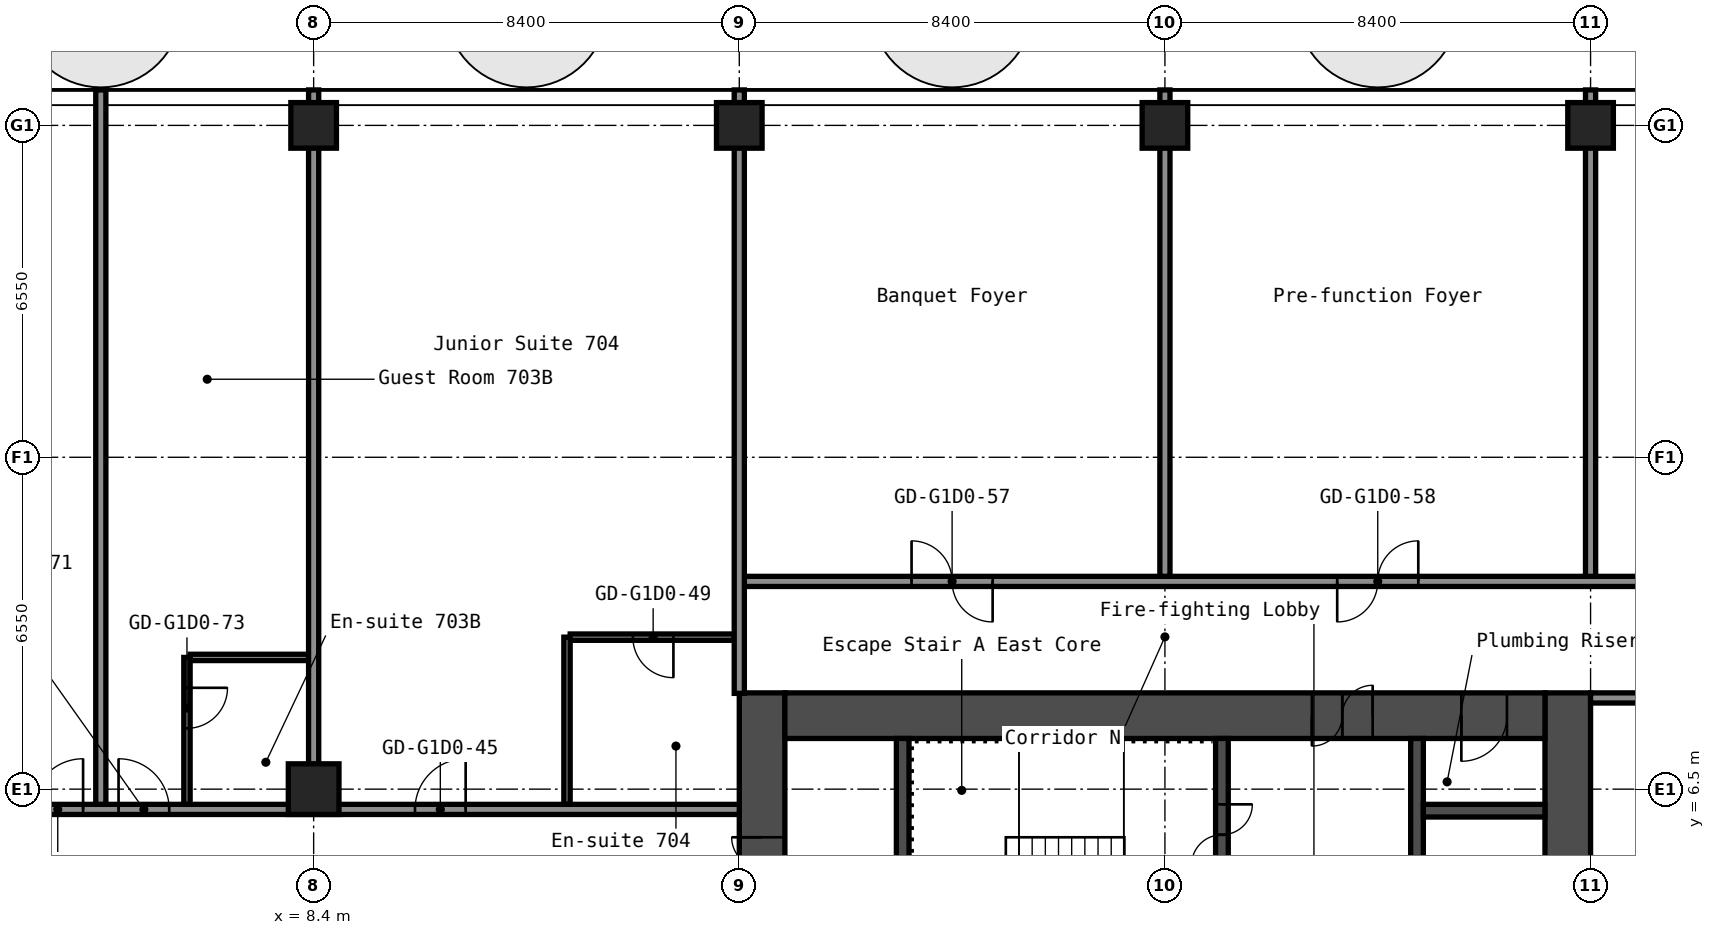
"""IFC4 building model, lengths in metres.
Left out: names, types, materials, properties, quantities, classifications, styles, units other than length and angle.
Written with IfcOpenShell. Run it as: python <this file> out.ifc"""

import sys

from ifc_helpers import new_model, si_unit, direction, frame, frame_2d, origin, origin_2d, place, context, subcontext, project, spatial, rectangle, hollow_rectangle, extrude, element, fill, save


model = new_model("IFC4")
c1 = context("Model", 3, precision=1e-05, world=origin(), true_north=direction((0.0, 1.0)))
c2 = subcontext(c1, "Body", "Model", "MODEL_VIEW")
j1 = project(units=[si_unit("LENGTHUNIT", "METRE"), si_unit("PLANEANGLEUNIT", "RADIAN")], contexts=[c1])
p1 = place(None, origin())
s1 = spatial("IfcSite", under=j1, at=p1, CompositionType="ELEMENT")
p2 = place(p1, origin())
s2 = spatial("IfcBuilding", under=s1, at=p2, CompositionType="ELEMENT")
p3 = place(p2, frame((0.0, 0.0, 29.4)))
s3 = spatial("IfcBuildingStorey", under=s2, at=p3, CompositionType="ELEMENT", Elevation=29.4)
p4 = place(p3, frame((8.4, 6.5, 0.0), z_axis=(0.0, 0.0, 1.0), x_axis=(1.0, 0.0, 0.0)))
e1 = element("IfcColumn", 1, at=p4, inside=s3, PredefinedType="COLUMN", context=c2, shape_type="SweptSolid", body=[
    extrude(hollow_rectangle(XDim=1.0, YDim=1.0, WallThickness=0.04, at=origin_2d()), origin(), (0.0, 0.0, 1.0), 2.8),
])
for number, where, z_axis, x_axis in (
    (2, (8.4, 19.6, 0.0), (0.0, 0.0, 1.0), (1.0, 0.0, 0.0)),
    (3, (16.8, 19.6, 0.0), (0.0, 0.0, 1.0), (1.0, 0.0, 0.0)),
    (4, (25.2, 19.6, 0.0), (0.0, 0.0, 1.0), (1.0, 0.0, 0.0)),
    (5, (33.6, 19.6, 0.0), (0.0, 0.0, 1.0), (1.0, 0.0, 0.0)),
):
    element("IfcColumn", number, at=place(p3, frame(where, z_axis=z_axis, x_axis=x_axis)), inside=s3, PredefinedType="COLUMN", context=c2, shape_type="SweptSolid", body=[
        extrude(hollow_rectangle(XDim=0.9, YDim=0.9, WallThickness=0.036, at=origin_2d()), origin(), (0.0, 0.0, 1.0), 2.8),
    ])
p5 = place(p3, frame((17.25, -8.4, 0.0), z_axis=(0.0, 0.0, 1.0), x_axis=(0.0, 1.0, 0.0)))
e6 = element("IfcWall", 6, at=p5, inside=s3, PredefinedType="SHEAR", context=c2, shape_type="SweptSolid", body=[
    extrude(rectangle(XDim=16.8, YDim=0.9, at=frame_2d((8.4, 0.0))), origin(), (0.0, 0.0, 1.0), 2.8),
])
p6 = place(p5, frame((12.75, 0.0, 0.0)))
e7 = element("IfcOpeningElement", 7, at=p6, cuts=e6, PredefinedType="OPENING", context=c2, shape_type="SweptSolid", body=[
    extrude(rectangle(XDim=1.2, YDim=2.1, at=frame_2d((0.6, 1.05))), frame((0.0, 0.46, 0.0), z_axis=(0.0, -1.0, 0.0), x_axis=(1.0, 0.0, 0.0)), (0.0, 0.0, 1.0), 0.92),
])
p7 = place(p5, frame((2.85, 0.0, 0.0)))
e8 = element("IfcOpeningElement", 8, at=p7, cuts=e6, PredefinedType="OPENING", context=c2, shape_type="SweptSolid", body=[
    extrude(rectangle(XDim=1.2, YDim=2.1, at=frame_2d((0.6, 1.05))), frame((0.0, 0.46, 0.0), z_axis=(0.0, -1.0, 0.0), x_axis=(1.0, 0.0, 0.0)), (0.0, 0.0, 1.0), 0.92),
])
p8 = place(p3, frame((33.15, -8.4, 0.0), z_axis=(0.0, 0.0, 1.0), x_axis=(0.0, 1.0, 0.0)))
e9 = element("IfcWall", 9, at=p8, inside=s3, PredefinedType="SHEAR", context=c2, shape_type="SweptSolid", body=[
    extrude(rectangle(XDim=16.8, YDim=0.9, at=frame_2d((8.4, 0.0))), origin(), (0.0, 0.0, 1.0), 2.8),
])
p9 = place(p3, frame((17.7, 7.95, 0.0), z_axis=(0.0, 0.0, 1.0), x_axis=(1.0, 0.0, 0.0)))
e10 = element("IfcWall", 10, at=p9, inside=s3, PredefinedType="SHEAR", context=c2, shape_type="SweptSolid", body=[
    extrude(rectangle(XDim=15.0, YDim=0.9, at=frame_2d((7.5, 0.0))), origin(), (0.0, 0.0, 1.0), 2.8),
])
p10 = place(p9, frame((10.4, 0.0, 0.0)))
e11 = element("IfcOpeningElement", 11, at=p10, cuts=e10, PredefinedType="OPENING", context=c2, shape_type="SweptSolid", body=[
    extrude(rectangle(XDim=1.2, YDim=2.1, at=frame_2d((0.6, 1.05))), frame((0.0, 0.46, 0.0), z_axis=(0.0, -1.0, 0.0), x_axis=(1.0, 0.0, 0.0)), (0.0, 0.0, 1.0), 0.92),
])
p11 = place(p9, frame((13.35, 0.0, 0.0)))
e12 = element("IfcOpeningElement", 12, at=p11, cuts=e10, PredefinedType="OPENING", context=c2, shape_type="SweptSolid", body=[
    extrude(rectangle(XDim=0.9, YDim=2.1, at=frame_2d((0.45, 1.05))), frame((0.0, 0.46, 0.0), z_axis=(0.0, -1.0, 0.0), x_axis=(1.0, 0.0, 0.0)), (0.0, 0.0, 1.0), 0.92),
])
p12 = place(p3, frame((20.025, 1.2, 0.0), z_axis=(0.0, 0.0, 1.0), x_axis=(0.0, 1.0, 0.0)))
e13 = element("IfcWall", 13, at=p12, inside=s3, PredefinedType="SHEAR", context=c2, shape_type="SweptSolid", body=[
    extrude(rectangle(XDim=6.3, YDim=0.25, at=frame_2d((3.15, 0.0))), origin(), (0.0, 0.0, 1.0), 2.8),
])
p13 = place(p3, frame((26.325, 3.75, 0.0), z_axis=(0.0, 0.0, 1.0), x_axis=(0.0, 1.0, 0.0)))
e14 = element("IfcWall", 14, at=p13, inside=s3, PredefinedType="SHEAR", context=c2, shape_type="SweptSolid", body=[
    extrude(rectangle(XDim=3.75, YDim=0.25, at=frame_2d((1.875, 0.0))), origin(), (0.0, 0.0, 1.0), 2.8),
])
p14 = place(p13, frame((1.25, 0.0, 0.0)))
e15 = element("IfcOpeningElement", 15, at=p14, cuts=e14, PredefinedType="OPENING", context=c2, shape_type="SweptSolid", body=[
    extrude(rectangle(XDim=1.2, YDim=2.1, at=frame_2d((0.6, 1.05))), frame((0.0, 0.135, 0.0), z_axis=(0.0, -1.0, 0.0), x_axis=(1.0, 0.0, 0.0)), (0.0, 0.0, 1.0), 0.27),
])
p15 = place(p3, frame((30.175, 1.45, 0.0), z_axis=(0.0, 0.0, 1.0), x_axis=(0.0, 1.0, 0.0)))
e16 = element("IfcWall", 16, at=p15, inside=s3, PredefinedType="SHEAR", context=c2, shape_type="SweptSolid", body=[
    extrude(rectangle(XDim=6.05, YDim=0.25, at=frame_2d((3.025, 0.0))), origin(), (0.0, 0.0, 1.0), 2.8),
])
p16 = place(p15, frame((2.625, 0.0, 0.0)))
e17 = element("IfcOpeningElement", 17, at=p16, cuts=e16, PredefinedType="OPENING", context=c2, shape_type="SweptSolid", body=[
    extrude(rectangle(XDim=1.1, YDim=2.1, at=frame_2d((0.55, 1.05))), frame((0.0, 0.135, 0.0), z_axis=(0.0, -1.0, 0.0), x_axis=(1.0, 0.0, 0.0)), (0.0, 0.0, 1.0), 0.27),
])
p17 = place(p3, frame((30.3, 6.075, 0.0), z_axis=(0.0, 0.0, 1.0), x_axis=(1.0, 0.0, 0.0)))
e18 = element("IfcWall", 18, at=p17, inside=s3, PredefinedType="SHEAR", context=c2, shape_type="SweptSolid", body=[
    extrude(rectangle(XDim=2.4, YDim=0.25, at=frame_2d((1.2, 0.0))), origin(), (0.0, 0.0, 1.0), 2.8),
])
p18 = place(p3, frame((-16.8, 6.1, 0.0), z_axis=(0.0, 0.0, 1.0), x_axis=(1.0, 0.0, 0.0)))
e19 = element("IfcWall", 19, at=p18, inside=s3, PredefinedType="PARTITIONING", context=c2, shape_type="SweptSolid", body=[
    extrude(rectangle(XDim=33.6, YDim=0.2, at=frame_2d((16.8, 0.0))), origin(), (0.0, 0.0, 1.0), 2.8),
])
p19 = place(p18, frame((2.85, 0.0, 0.0)))
e20 = element("IfcOpeningElement", 20, at=p19, cuts=e19, PredefinedType="OPENING", context=c2, shape_type="SweptSolid", body=[
    extrude(rectangle(XDim=1.0, YDim=2.1, at=frame_2d((0.5, 1.05))), frame((0.0, 0.11, 0.0), z_axis=(0.0, -1.0, 0.0), x_axis=(1.0, 0.0, 0.0)), (0.0, 0.0, 1.0), 0.22),
])
p20 = place(p18, frame((4.55, 0.0, 0.0)))
e21 = element("IfcOpeningElement", 21, at=p20, cuts=e19, PredefinedType="OPENING", context=c2, shape_type="SweptSolid", body=[
    extrude(rectangle(XDim=1.0, YDim=2.1, at=frame_2d((0.5, 1.05))), frame((0.0, 0.11, 0.0), z_axis=(0.0, -1.0, 0.0), x_axis=(1.0, 0.0, 0.0)), (0.0, 0.0, 1.0), 0.22),
])
p21 = place(p18, frame((13.8, 0.0, 0.0)))
e22 = element("IfcOpeningElement", 22, at=p21, cuts=e19, PredefinedType="OPENING", context=c2, shape_type="SweptSolid", body=[
    extrude(rectangle(XDim=1.0, YDim=2.1, at=frame_2d((0.5, 1.05))), frame((0.0, 0.11, 0.0), z_axis=(0.0, -1.0, 0.0), x_axis=(1.0, 0.0, 0.0)), (0.0, 0.0, 1.0), 0.22),
])
p22 = place(p18, frame((19.65, 0.0, 0.0)))
e23 = element("IfcOpeningElement", 23, at=p22, cuts=e19, PredefinedType="OPENING", context=c2, shape_type="SweptSolid", body=[
    extrude(rectangle(XDim=1.0, YDim=2.1, at=frame_2d((0.5, 1.05))), frame((0.0, 0.11, 0.0), z_axis=(0.0, -1.0, 0.0), x_axis=(1.0, 0.0, 0.0)), (0.0, 0.0, 1.0), 0.22),
])
p23 = place(p18, frame((21.35, 0.0, 0.0)))
e24 = element("IfcOpeningElement", 24, at=p23, cuts=e19, PredefinedType="OPENING", context=c2, shape_type="SweptSolid", body=[
    extrude(rectangle(XDim=1.0, YDim=2.1, at=frame_2d((0.5, 1.05))), frame((0.0, 0.11, 0.0), z_axis=(0.0, -1.0, 0.0), x_axis=(1.0, 0.0, 0.0)), (0.0, 0.0, 1.0), 0.22),
])
p24 = place(p18, frame((27.2, 0.0, 0.0)))
e25 = element("IfcOpeningElement", 25, at=p24, cuts=e19, PredefinedType="OPENING", context=c2, shape_type="SweptSolid", body=[
    extrude(rectangle(XDim=1.0, YDim=2.1, at=frame_2d((0.5, 1.05))), frame((0.0, 0.11, 0.0), z_axis=(0.0, -1.0, 0.0), x_axis=(1.0, 0.0, 0.0)), (0.0, 0.0, 1.0), 0.22),
])
p25 = place(p3, frame((33.6, 8.3, 0.0), z_axis=(0.0, 0.0, 1.0), x_axis=(1.0, 0.0, 0.0)))
e26 = element("IfcWall", 26, at=p25, inside=s3, PredefinedType="PARTITIONING", context=c2, shape_type="SweptSolid", body=[
    extrude(rectangle(XDim=15.0, YDim=0.2, at=frame_2d((7.5, 0.0))), origin(), (0.0, 0.0, 1.0), 2.8),
])
p26 = place(p25, frame((4.8, 0.0, 0.0)))
e27 = element("IfcOpeningElement", 27, at=p26, cuts=e26, PredefinedType="OPENING", context=c2, shape_type="SweptSolid", body=[
    extrude(rectangle(XDim=1.6, YDim=2.1, at=frame_2d((0.8, 1.05))), frame((0.0, 0.11, 0.0), z_axis=(0.0, -1.0, 0.0), x_axis=(1.0, 0.0, 0.0)), (0.0, 0.0, 1.0), 0.22),
])
p27 = place(p3, frame((5.962, 9.1, 0.0), z_axis=(0.0, 0.0, 1.0), x_axis=(1.0, 0.0, 0.0)))
e28 = element("IfcWall", 28, at=p27, inside=s3, PredefinedType="PARTITIONING", context=c2, shape_type="SweptSolid", body=[
    extrude(rectangle(XDim=2.338, YDim=0.125, at=frame_2d((1.169, 0.0))), origin(), (0.0, 0.0, 1.0), 2.8),
])
p28 = place(p3, frame((13.462, 9.5, 0.0), z_axis=(0.0, 0.0, 1.0), x_axis=(1.0, 0.0, 0.0)))
e29 = element("IfcWall", 29, at=p28, inside=s3, PredefinedType="PARTITIONING", context=c2, shape_type="SweptSolid", body=[
    extrude(rectangle(XDim=3.238, YDim=0.125, at=frame_2d((1.619, 0.0))), origin(), (0.0, 0.0, 1.0), 2.8),
])
p29 = place(p28, frame((1.238, 0.0, 0.0)))
e30 = element("IfcOpeningElement", 30, at=p29, cuts=e29, PredefinedType="OPENING", context=c2, shape_type="SweptSolid", body=[
    extrude(rectangle(XDim=0.8, YDim=2.1, at=frame_2d((0.4, 1.05))), frame((0.0, 0.073, 0.0), z_axis=(0.0, -1.0, 0.0), x_axis=(1.0, 0.0, 0.0)), (0.0, 0.0, 1.0), 0.145),
])
p30 = place(p3, frame((16.8, 10.6, 0.0), z_axis=(0.0, 0.0, 1.0), x_axis=(1.0, 0.0, 0.0)))
e31 = element("IfcWall", 31, at=p30, inside=s3, PredefinedType="PARTITIONING", context=c2, shape_type="SweptSolid", body=[
    extrude(rectangle(XDim=34.3, YDim=0.2, at=frame_2d((17.15, 0.0))), origin(), (0.0, 0.0, 1.0), 2.8),
])
p31 = place(p30, frame((3.4, 0.0, 0.0)))
e32 = element("IfcOpeningElement", 32, at=p31, cuts=e31, PredefinedType="OPENING", context=c2, shape_type="SweptSolid", body=[
    extrude(rectangle(XDim=1.6, YDim=2.1, at=frame_2d((0.8, 1.05))), frame((0.0, 0.11, 0.0), z_axis=(0.0, -1.0, 0.0), x_axis=(1.0, 0.0, 0.0)), (0.0, 0.0, 1.0), 0.22),
])
p32 = place(p30, frame((11.8, 0.0, 0.0)))
e33 = element("IfcOpeningElement", 33, at=p32, cuts=e31, PredefinedType="OPENING", context=c2, shape_type="SweptSolid", body=[
    extrude(rectangle(XDim=1.6, YDim=2.1, at=frame_2d((0.8, 1.05))), frame((0.0, 0.11, 0.0), z_axis=(0.0, -1.0, 0.0), x_axis=(1.0, 0.0, 0.0)), (0.0, 0.0, 1.0), 0.22),
])
p33 = place(p30, frame((20.2, 0.0, 0.0)))
e34 = element("IfcOpeningElement", 34, at=p33, cuts=e31, PredefinedType="OPENING", context=c2, shape_type="SweptSolid", body=[
    extrude(rectangle(XDim=1.6, YDim=2.1, at=frame_2d((0.8, 1.05))), frame((0.0, 0.11, 0.0), z_axis=(0.0, -1.0, 0.0), x_axis=(1.0, 0.0, 0.0)), (0.0, 0.0, 1.0), 0.22),
])
p34 = place(p30, frame((28.8, 0.0, 0.0)))
e35 = element("IfcOpeningElement", 35, at=p34, cuts=e31, PredefinedType="OPENING", context=c2, shape_type="SweptSolid", body=[
    extrude(rectangle(XDim=1.6, YDim=2.1, at=frame_2d((0.8, 1.05))), frame((0.0, 0.11, 0.0), z_axis=(0.0, -1.0, 0.0), x_axis=(1.0, 0.0, 0.0)), (0.0, 0.0, 1.0), 0.22),
])
p35 = place(p3, frame((4.2, 6.2, 0.0), z_axis=(0.0, 0.0, 1.0), x_axis=(0.0, 1.0, 0.0)))
e36 = element("IfcWall", 36, at=p35, inside=s3, PredefinedType="PARTITIONING", context=c2, shape_type="SweptSolid", body=[
    extrude(rectangle(XDim=14.1, YDim=0.2, at=frame_2d((7.05, 0.0))), origin(), (0.0, 0.0, 1.0), 2.8),
])
p36 = place(p3, frame((5.9, 6.2, 0.0), z_axis=(0.0, 0.0, 1.0), x_axis=(0.0, 1.0, 0.0)))
e37 = element("IfcWall", 37, at=p36, inside=s3, PredefinedType="PARTITIONING", context=c2, shape_type="SweptSolid", body=[
    extrude(rectangle(XDim=2.9, YDim=0.125, at=frame_2d((1.45, 0.0))), origin(), (0.0, 0.0, 1.0), 2.8),
])
p37 = place(p36, frame((1.5, 0.0, 0.0)))
e38 = element("IfcOpeningElement", 38, at=p37, cuts=e37, PredefinedType="OPENING", context=c2, shape_type="SweptSolid", body=[
    extrude(rectangle(XDim=0.8, YDim=2.1, at=frame_2d((0.4, 1.05))), frame((0.0, 0.073, 0.0), z_axis=(0.0, -1.0, 0.0), x_axis=(1.0, 0.0, 0.0)), (0.0, 0.0, 1.0), 0.145),
])
p38 = place(p3, frame((8.4, 6.99, 0.0), z_axis=(0.0, 0.0, 1.0), x_axis=(0.0, 1.0, 0.0)))
e39 = element("IfcWall", 39, at=p38, inside=s3, PredefinedType="PARTITIONING", context=c2, shape_type="SweptSolid", body=[
    extrude(rectangle(XDim=13.31, YDim=0.2, at=frame_2d((6.655, 0.0))), origin(), (0.0, 0.0, 1.0), 2.8),
])
p39 = place(p3, frame((13.4, 6.2, 0.0), z_axis=(0.0, 0.0, 1.0), x_axis=(0.0, 1.0, 0.0)))
e40 = element("IfcWall", 40, at=p39, inside=s3, PredefinedType="PARTITIONING", context=c2, shape_type="SweptSolid", body=[
    extrude(rectangle(XDim=3.3, YDim=0.125, at=frame_2d((1.65, 0.0))), origin(), (0.0, 0.0, 1.0), 2.8),
])
p40 = place(p3, frame((16.8, 8.39, 0.0), z_axis=(0.0, 0.0, 1.0), x_axis=(0.0, 1.0, 0.0)))
e41 = element("IfcWall", 41, at=p40, inside=s3, PredefinedType="PARTITIONING", context=c2, shape_type="SweptSolid", body=[
    extrude(rectangle(XDim=11.91, YDim=0.2, at=frame_2d((5.955, 0.0))), origin(), (0.0, 0.0, 1.0), 2.8),
])
for number, where, z_axis, x_axis in (
    (42, (25.2, 10.7, 0.0), (0.0, 0.0, 1.0), (0.0, 1.0, 0.0)),
    (43, (33.6, 10.7, 0.0), (0.0, 0.0, 1.0), (0.0, 1.0, 0.0)),
):
    element("IfcWall", number, at=place(p3, frame(where, z_axis=z_axis, x_axis=x_axis)), inside=s3, PredefinedType="PARTITIONING", context=c2, shape_type="SweptSolid", body=[
        extrude(rectangle(XDim=9.6, YDim=0.2, at=frame_2d((4.8, 0.0))), origin(), (0.0, 0.0, 1.0), 2.8),
    ])
p41 = place(p6, origin())
e44 = element("IfcDoor", 44, at=p41, inside=s3, OperationType="DOUBLE_DOOR_SINGLE_SWING", PredefinedType="DOOR", context=c2, shape_type="SweptSolid", body=[
    extrude(rectangle(XDim=1.2, YDim=2.1, at=frame_2d((0.6, 1.05))), frame((0.0, 0.025, 0.0), z_axis=(0.0, -1.0, 0.0), x_axis=(1.0, 0.0, 0.0)), (0.0, 0.0, 1.0), 0.05),
])
fill(e7, e44)
p42 = place(p10, origin())
e45 = element("IfcDoor", 45, at=p42, inside=s3, OperationType="DOUBLE_DOOR_SINGLE_SWING", PredefinedType="DOOR", context=c2, shape_type="SweptSolid", body=[
    extrude(rectangle(XDim=1.2, YDim=2.1, at=frame_2d((0.6, 1.05))), frame((0.0, 0.025, 0.0), z_axis=(0.0, -1.0, 0.0), x_axis=(1.0, 0.0, 0.0)), (0.0, 0.0, 1.0), 0.05),
])
fill(e11, e45)
p43 = place(p11, origin())
e46 = element("IfcDoor", 46, at=p43, inside=s3, OperationType="SINGLE_SWING_LEFT", PredefinedType="DOOR", context=c2, shape_type="SweptSolid", body=[
    extrude(rectangle(XDim=0.9, YDim=2.1, at=frame_2d((0.45, 1.05))), frame((0.0, 0.025, 0.0), z_axis=(0.0, -1.0, 0.0), x_axis=(1.0, 0.0, 0.0)), (0.0, 0.0, 1.0), 0.05),
])
fill(e12, e46)
p44 = place(p14, origin())
e47 = element("IfcDoor", 47, at=p44, inside=s3, OperationType="DOUBLE_DOOR_SINGLE_SWING", PredefinedType="DOOR", context=c2, shape_type="SweptSolid", body=[
    extrude(rectangle(XDim=1.2, YDim=2.1, at=frame_2d((0.6, 1.05))), frame((0.0, 0.025, 0.0), z_axis=(0.0, -1.0, 0.0), x_axis=(1.0, 0.0, 0.0)), (0.0, 0.0, 1.0), 0.05),
])
fill(e15, e47)
p45 = place(p22, origin())
e48 = element("IfcDoor", 48, at=p45, inside=s3, OperationType="SINGLE_SWING_LEFT", PredefinedType="DOOR", context=c2, shape_type="SweptSolid", body=[
    extrude(rectangle(XDim=1.0, YDim=2.1, at=frame_2d((0.5, 1.05))), frame((0.0, 0.025, 0.0), z_axis=(0.0, -1.0, 0.0), x_axis=(1.0, 0.0, 0.0)), (0.0, 0.0, 1.0), 0.05),
])
fill(e23, e48)
p46 = place(p23, origin())
e49 = element("IfcDoor", 49, at=p46, inside=s3, OperationType="SINGLE_SWING_RIGHT", PredefinedType="DOOR", context=c2, shape_type="SweptSolid", body=[
    extrude(rectangle(XDim=1.0, YDim=2.1, at=frame_2d((0.5, 1.05))), frame((0.0, 0.025, 0.0), z_axis=(0.0, -1.0, 0.0), x_axis=(1.0, 0.0, 0.0)), (0.0, 0.0, 1.0), 0.05),
])
fill(e24, e49)
p47 = place(p24, origin())
e50 = element("IfcDoor", 50, at=p47, inside=s3, OperationType="SINGLE_SWING_LEFT", PredefinedType="DOOR", context=c2, shape_type="SweptSolid", body=[
    extrude(rectangle(XDim=1.0, YDim=2.1, at=frame_2d((0.5, 1.05))), frame((0.0, 0.025, 0.0), z_axis=(0.0, -1.0, 0.0), x_axis=(1.0, 0.0, 0.0)), (0.0, 0.0, 1.0), 0.05),
])
fill(e25, e50)
p48 = place(p29, origin())
e51 = element("IfcDoor", 51, at=p48, inside=s3, OperationType="SINGLE_SWING_RIGHT", PredefinedType="DOOR", context=c2, shape_type="SweptSolid", body=[
    extrude(rectangle(XDim=0.8, YDim=2.1, at=frame_2d((0.4, 1.05))), frame((0.0, 0.025, 0.0), z_axis=(0.0, -1.0, 0.0), x_axis=(1.0, 0.0, 0.0)), (0.0, 0.0, 1.0), 0.05),
])
fill(e30, e51)
p49 = place(p31, origin())
e52 = element("IfcDoor", 52, at=p49, inside=s3, OperationType="DOUBLE_DOOR_SINGLE_SWING", PredefinedType="DOOR", context=c2, shape_type="SweptSolid", body=[
    extrude(rectangle(XDim=1.6, YDim=2.1, at=frame_2d((0.8, 1.05))), frame((0.0, 0.025, 0.0), z_axis=(0.0, -1.0, 0.0), x_axis=(1.0, 0.0, 0.0)), (0.0, 0.0, 1.0), 0.05),
])
fill(e32, e52)
p50 = place(p32, origin())
e53 = element("IfcDoor", 53, at=p50, inside=s3, OperationType="DOUBLE_DOOR_SINGLE_SWING", PredefinedType="DOOR", context=c2, shape_type="SweptSolid", body=[
    extrude(rectangle(XDim=1.6, YDim=2.1, at=frame_2d((0.8, 1.05))), frame((0.0, 0.025, 0.0), z_axis=(0.0, -1.0, 0.0), x_axis=(1.0, 0.0, 0.0)), (0.0, 0.0, 1.0), 0.05),
])
fill(e33, e53)
p51 = place(p37, origin())
e54 = element("IfcDoor", 54, at=p51, inside=s3, OperationType="SINGLE_SWING_RIGHT", PredefinedType="DOOR", context=c2, shape_type="SweptSolid", body=[
    extrude(rectangle(XDim=0.8, YDim=2.1, at=frame_2d((0.4, 1.05))), frame((0.0, 0.025, 0.0), z_axis=(0.0, -1.0, 0.0), x_axis=(1.0, 0.0, 0.0)), (0.0, 0.0, 1.0), 0.05),
])
fill(e38, e54)
save(model, sys.argv[1])
